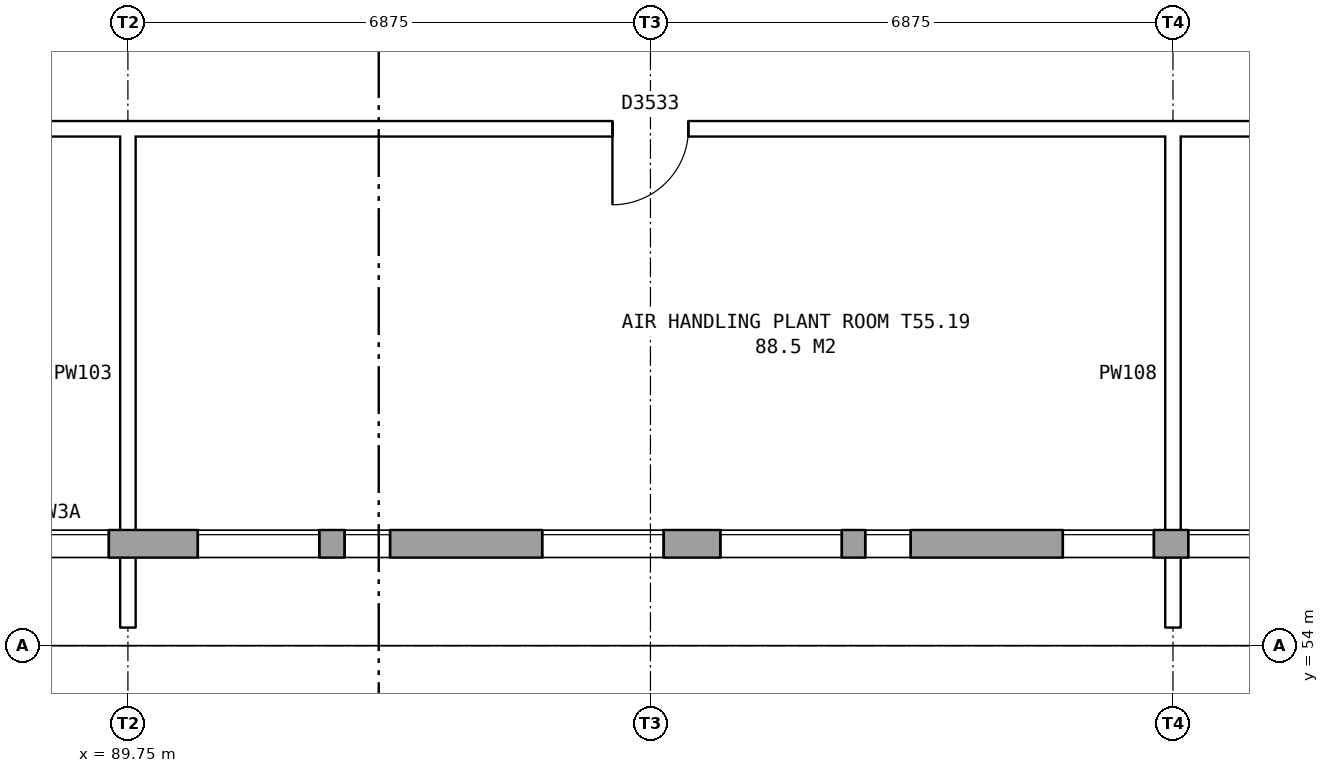
"""IFC4 building model, lengths in metres.
Left out: names, types, materials, properties, quantities, classifications, styles, units other than length and angle.
Written with IfcOpenShell. Run it as: python <this file> out.ifc"""

import sys

from ifc_helpers import new_model, si_unit, direction, frame, frame_2d, origin, place, context, subcontext, project, spatial, rectangle, extrude, element, fill, save


model = new_model("IFC4")
c1 = context("Model", 3, precision=1e-05, world=origin(), true_north=direction((0.0, 1.0)))
c2 = subcontext(c1, "Body", "Model", "MODEL_VIEW")
j1 = project(units=[si_unit("LENGTHUNIT", "METRE"), si_unit("PLANEANGLEUNIT", "RADIAN")], contexts=[c1])
p1 = place(None, origin())
s1 = spatial("IfcSite", under=j1, at=p1, CompositionType="ELEMENT")
p2 = place(p1, origin())
s2 = spatial("IfcBuilding", under=s1, at=p2, CompositionType="ELEMENT")
p3 = place(p2, frame((0.0, 0.0, 194.4)))
s3 = spatial("IfcBuildingStorey", under=s2, at=p3, CompositionType="ELEMENT", Elevation=194.4)
p4 = place(p3, frame((76.15, 55.34, 0.0), z_axis=(0.0, 0.0, 1.0), x_axis=(1.0, 0.0, 0.0)))
e1 = element("IfcWall", 1, at=p4, inside=s3, PredefinedType="STANDARD", context=c2, shape_type="SweptSolid", body=[
    extrude(rectangle(XDim=54.7, YDim=0.36, at=frame_2d((27.35, 0.0))), origin(), (0.0, 0.0, 1.0), 3.95),
])
p5 = place(p4, frame((0.769, 0.0, 1.5)))
e2 = element("IfcOpeningElement", 2, at=p5, cuts=e1, PredefinedType="OPENING", context=c2, shape_type="SweptSolid", body=[
    extrude(rectangle(XDim=1.6, YDim=1.2, at=frame_2d((0.8, 0.6))), frame((0.0, 0.19, 0.0), z_axis=(0.0, -1.0, 0.0), x_axis=(1.0, 0.0, 0.0)), (0.0, 0.0, 1.0), 0.38),
])
p6 = place(p4, frame((2.7, 0.0, 1.5)))
e3 = element("IfcOpeningElement", 3, at=p6, cuts=e1, PredefinedType="OPENING", context=c2, shape_type="SweptSolid", body=[
    extrude(rectangle(XDim=0.6, YDim=1.2, at=frame_2d((0.3, 0.6))), frame((0.0, 0.19, 0.0), z_axis=(0.0, -1.0, 0.0), x_axis=(1.0, 0.0, 0.0)), (0.0, 0.0, 1.0), 0.38),
])
p7 = place(p4, frame((7.644, 0.0, 1.5)))
e4 = element("IfcOpeningElement", 4, at=p7, cuts=e1, PredefinedType="OPENING", context=c2, shape_type="SweptSolid", body=[
    extrude(rectangle(XDim=1.6, YDim=1.2, at=frame_2d((0.8, 0.6))), frame((0.0, 0.19, 0.0), z_axis=(0.0, -1.0, 0.0), x_axis=(1.0, 0.0, 0.0)), (0.0, 0.0, 1.0), 0.38),
])
p8 = place(p4, frame((5.3, 0.0, 1.5)))
e5 = element("IfcOpeningElement", 5, at=p8, cuts=e1, PredefinedType="OPENING", context=c2, shape_type="SweptSolid", body=[
    extrude(rectangle(XDim=1.6, YDim=1.2, at=frame_2d((0.8, 0.6))), frame((0.0, 0.19, 0.0), z_axis=(0.0, -1.0, 0.0), x_axis=(1.0, 0.0, 0.0)), (0.0, 0.0, 1.0), 0.38),
])
p9 = place(p4, frame((14.519, 0.0, 1.5)))
e6 = element("IfcOpeningElement", 6, at=p9, cuts=e1, PredefinedType="OPENING", context=c2, shape_type="SweptSolid", body=[
    extrude(rectangle(XDim=1.6, YDim=1.2, at=frame_2d((0.8, 0.6))), frame((0.0, 0.19, 0.0), z_axis=(0.0, -1.0, 0.0), x_axis=(1.0, 0.0, 0.0)), (0.0, 0.0, 1.0), 0.38),
])
p10 = place(p4, frame((16.45, 0.0, 1.5)))
e7 = element("IfcOpeningElement", 7, at=p10, cuts=e1, PredefinedType="OPENING", context=c2, shape_type="SweptSolid", body=[
    extrude(rectangle(XDim=0.6, YDim=1.2, at=frame_2d((0.3, 0.6))), frame((0.0, 0.19, 0.0), z_axis=(0.0, -1.0, 0.0), x_axis=(1.0, 0.0, 0.0)), (0.0, 0.0, 1.0), 0.38),
])
p11 = place(p4, frame((21.394, 0.0, 1.5)))
e8 = element("IfcOpeningElement", 8, at=p11, cuts=e1, PredefinedType="OPENING", context=c2, shape_type="SweptSolid", body=[
    extrude(rectangle(XDim=1.6, YDim=1.2, at=frame_2d((0.8, 0.6))), frame((0.0, 0.19, 0.0), z_axis=(0.0, -1.0, 0.0), x_axis=(1.0, 0.0, 0.0)), (0.0, 0.0, 1.0), 0.38),
])
p12 = place(p4, frame((19.05, 0.0, 1.5)))
e9 = element("IfcOpeningElement", 9, at=p12, cuts=e1, PredefinedType="OPENING", context=c2, shape_type="SweptSolid", body=[
    extrude(rectangle(XDim=1.6, YDim=1.2, at=frame_2d((0.8, 0.6))), frame((0.0, 0.19, 0.0), z_axis=(0.0, -1.0, 0.0), x_axis=(1.0, 0.0, 0.0)), (0.0, 0.0, 1.0), 0.38),
])
p13 = place(p4, frame((27.55, 0.0, 1.5)))
e10 = element("IfcOpeningElement", 10, at=p13, cuts=e1, PredefinedType="OPENING", context=c2, shape_type="SweptSolid", body=[
    extrude(rectangle(XDim=1.2, YDim=1.2, at=frame_2d((0.6, 0.6))), frame((0.0, 0.19, 0.0), z_axis=(0.0, -1.0, 0.0), x_axis=(1.0, 0.0, 0.0)), (0.0, 0.0, 1.0), 0.38),
])
p14 = place(p4, frame((31.706, 0.0, 1.5)))
e11 = element("IfcOpeningElement", 11, at=p14, cuts=e1, PredefinedType="OPENING", context=c2, shape_type="SweptSolid", body=[
    extrude(rectangle(XDim=1.6, YDim=1.2, at=frame_2d((0.8, 0.6))), frame((0.0, 0.19, 0.0), z_axis=(0.0, -1.0, 0.0), x_axis=(1.0, 0.0, 0.0)), (0.0, 0.0, 1.0), 0.38),
])
p15 = place(p4, frame((30.65, 0.0, 1.5)))
e12 = element("IfcOpeningElement", 12, at=p15, cuts=e1, PredefinedType="OPENING", context=c2, shape_type="SweptSolid", body=[
    extrude(rectangle(XDim=0.6, YDim=1.2, at=frame_2d((0.3, 0.6))), frame((0.0, 0.19, 0.0), z_axis=(0.0, -1.0, 0.0), x_axis=(1.0, 0.0, 0.0)), (0.0, 0.0, 1.0), 0.38),
])
p16 = place(p4, frame((38.581, 0.0, 1.5)))
e13 = element("IfcOpeningElement", 13, at=p16, cuts=e1, PredefinedType="OPENING", context=c2, shape_type="SweptSolid", body=[
    extrude(rectangle(XDim=1.6, YDim=1.2, at=frame_2d((0.8, 0.6))), frame((0.0, 0.19, 0.0), z_axis=(0.0, -1.0, 0.0), x_axis=(1.0, 0.0, 0.0)), (0.0, 0.0, 1.0), 0.38),
])
p17 = place(p4, frame((41.3, 0.0, 1.5)))
e14 = element("IfcOpeningElement", 14, at=p17, cuts=e1, PredefinedType="OPENING", context=c2, shape_type="SweptSolid", body=[
    extrude(rectangle(XDim=1.2, YDim=1.2, at=frame_2d((0.6, 0.6))), frame((0.0, 0.19, 0.0), z_axis=(0.0, -1.0, 0.0), x_axis=(1.0, 0.0, 0.0)), (0.0, 0.0, 1.0), 0.38),
])
p18 = place(p4, frame((45.456, 0.0, 1.5)))
e15 = element("IfcOpeningElement", 15, at=p18, cuts=e1, PredefinedType="OPENING", context=c2, shape_type="SweptSolid", body=[
    extrude(rectangle(XDim=1.6, YDim=1.2, at=frame_2d((0.8, 0.6))), frame((0.0, 0.19, 0.0), z_axis=(0.0, -1.0, 0.0), x_axis=(1.0, 0.0, 0.0)), (0.0, 0.0, 1.0), 0.38),
])
p19 = place(p4, frame((44.4, 0.0, 1.5)))
e16 = element("IfcOpeningElement", 16, at=p19, cuts=e1, PredefinedType="OPENING", context=c2, shape_type="SweptSolid", body=[
    extrude(rectangle(XDim=0.6, YDim=1.2, at=frame_2d((0.3, 0.6))), frame((0.0, 0.19, 0.0), z_axis=(0.0, -1.0, 0.0), x_axis=(1.0, 0.0, 0.0)), (0.0, 0.0, 1.0), 0.38),
])
p20 = place(p4, frame((52.331, 0.0, 1.5)))
e17 = element("IfcOpeningElement", 17, at=p20, cuts=e1, PredefinedType="OPENING", context=c2, shape_type="SweptSolid", body=[
    extrude(rectangle(XDim=1.6, YDim=1.2, at=frame_2d((0.8, 0.6))), frame((0.0, 0.19, 0.0), z_axis=(0.0, -1.0, 0.0), x_axis=(1.0, 0.0, 0.0)), (0.0, 0.0, 1.0), 0.38),
])
p21 = place(p4, frame((9.55, 0.0, 1.5)))
e18 = element("IfcOpeningElement", 18, at=p21, cuts=e1, PredefinedType="OPENING", context=c2, shape_type="SweptSolid", body=[
    extrude(rectangle(XDim=0.6, YDim=1.2, at=frame_2d((0.3, 0.6))), frame((0.0, 0.19, 0.0), z_axis=(0.0, -1.0, 0.0), x_axis=(1.0, 0.0, 0.0)), (0.0, 0.0, 1.0), 0.38),
])
p22 = place(p4, frame((12.15, 0.0, 1.5)))
e19 = element("IfcOpeningElement", 19, at=p22, cuts=e1, PredefinedType="OPENING", context=c2, shape_type="SweptSolid", body=[
    extrude(rectangle(XDim=1.2, YDim=1.2, at=frame_2d((0.6, 0.6))), frame((0.0, 0.19, 0.0), z_axis=(0.0, -1.0, 0.0), x_axis=(1.0, 0.0, 0.0)), (0.0, 0.0, 1.0), 0.38),
])
p23 = place(p4, frame((23.3, 0.0, 1.5)))
e20 = element("IfcOpeningElement", 20, at=p23, cuts=e1, PredefinedType="OPENING", context=c2, shape_type="SweptSolid", body=[
    extrude(rectangle(XDim=0.6, YDim=1.2, at=frame_2d((0.3, 0.6))), frame((0.0, 0.19, 0.0), z_axis=(0.0, -1.0, 0.0), x_axis=(1.0, 0.0, 0.0)), (0.0, 0.0, 1.0), 0.38),
])
p24 = place(p4, frame((25.9, 0.0, 1.5)))
e21 = element("IfcOpeningElement", 21, at=p24, cuts=e1, PredefinedType="OPENING", context=c2, shape_type="SweptSolid", body=[
    extrude(rectangle(XDim=1.2, YDim=1.2, at=frame_2d((0.6, 0.6))), frame((0.0, 0.19, 0.0), z_axis=(0.0, -1.0, 0.0), x_axis=(1.0, 0.0, 0.0)), (0.0, 0.0, 1.0), 0.38),
])
p25 = place(p4, frame((33.65, 0.0, 1.5)))
e22 = element("IfcOpeningElement", 22, at=p25, cuts=e1, PredefinedType="OPENING", context=c2, shape_type="SweptSolid", body=[
    extrude(rectangle(XDim=1.6, YDim=1.2, at=frame_2d((0.8, 0.6))), frame((0.0, 0.19, 0.0), z_axis=(0.0, -1.0, 0.0), x_axis=(1.0, 0.0, 0.0)), (0.0, 0.0, 1.0), 0.38),
])
p26 = place(p4, frame((37.5, 0.0, 1.5)))
e23 = element("IfcOpeningElement", 23, at=p26, cuts=e1, PredefinedType="OPENING", context=c2, shape_type="SweptSolid", body=[
    extrude(rectangle(XDim=0.6, YDim=1.2, at=frame_2d((0.3, 0.6))), frame((0.0, 0.19, 0.0), z_axis=(0.0, -1.0, 0.0), x_axis=(1.0, 0.0, 0.0)), (0.0, 0.0, 1.0), 0.38),
])
p27 = place(p4, frame((47.4, 0.0, 1.5)))
e24 = element("IfcOpeningElement", 24, at=p27, cuts=e1, PredefinedType="OPENING", context=c2, shape_type="SweptSolid", body=[
    extrude(rectangle(XDim=1.6, YDim=1.2, at=frame_2d((0.8, 0.6))), frame((0.0, 0.19, 0.0), z_axis=(0.0, -1.0, 0.0), x_axis=(1.0, 0.0, 0.0)), (0.0, 0.0, 1.0), 0.38),
])
p28 = place(p4, frame((51.25, 0.0, 1.5)))
e25 = element("IfcOpeningElement", 25, at=p28, cuts=e1, PredefinedType="OPENING", context=c2, shape_type="SweptSolid", body=[
    extrude(rectangle(XDim=0.6, YDim=1.2, at=frame_2d((0.3, 0.6))), frame((0.0, 0.19, 0.0), z_axis=(0.0, -1.0, 0.0), x_axis=(1.0, 0.0, 0.0)), (0.0, 0.0, 1.0), 0.38),
])
p29 = place(p3, frame((32.24, 60.8, 0.0), z_axis=(0.0, 0.0, 1.0), x_axis=(1.0, 0.0, 0.0)))
e26 = element("IfcWall", 26, at=p29, inside=s3, PredefinedType="PARTITIONING", context=c2, shape_type="SweptSolid", body=[
    extrude(rectangle(XDim=136.52, YDim=0.2, at=frame_2d((68.26, 0.0))), origin(), (0.0, 0.0, 1.0), 3.95),
])
p30 = place(p29, frame((3.44, 0.0, 0.0)))
e27 = element("IfcOpeningElement", 27, at=p30, cuts=e26, PredefinedType="OPENING", context=c2, shape_type="SweptSolid", body=[
    extrude(rectangle(XDim=1.0, YDim=2.1, at=frame_2d((0.5, 1.05))), frame((0.0, 0.11, 0.0), z_axis=(0.0, -1.0, 0.0), x_axis=(1.0, 0.0, 0.0)), (0.0, 0.0, 1.0), 0.22),
])
p31 = place(p29, frame((13.26, 0.0, 0.0)))
e28 = element("IfcOpeningElement", 28, at=p31, cuts=e26, PredefinedType="OPENING", context=c2, shape_type="SweptSolid", body=[
    extrude(rectangle(XDim=1.0, YDim=2.1, at=frame_2d((0.5, 1.05))), frame((0.0, 0.11, 0.0), z_axis=(0.0, -1.0, 0.0), x_axis=(1.0, 0.0, 0.0)), (0.0, 0.0, 1.0), 0.22),
])
p32 = place(p29, frame((25.26, 0.0, 0.0)))
e29 = element("IfcOpeningElement", 29, at=p32, cuts=e26, PredefinedType="OPENING", context=c2, shape_type="SweptSolid", body=[
    extrude(rectangle(XDim=1.0, YDim=2.1, at=frame_2d((0.5, 1.05))), frame((0.0, 0.11, 0.0), z_axis=(0.0, -1.0, 0.0), x_axis=(1.0, 0.0, 0.0)), (0.0, 0.0, 1.0), 0.22),
])
p33 = place(p29, frame((37.08, 0.0, 0.0)))
e30 = element("IfcOpeningElement", 30, at=p33, cuts=e26, PredefinedType="OPENING", context=c2, shape_type="SweptSolid", body=[
    extrude(rectangle(XDim=1.0, YDim=2.1, at=frame_2d((0.5, 1.05))), frame((0.0, 0.11, 0.0), z_axis=(0.0, -1.0, 0.0), x_axis=(1.0, 0.0, 0.0)), (0.0, 0.0, 1.0), 0.22),
])
p34 = place(p29, frame((49.955, 0.0, 0.0)))
e31 = element("IfcOpeningElement", 31, at=p34, cuts=e26, PredefinedType="OPENING", context=c2, shape_type="SweptSolid", body=[
    extrude(rectangle(XDim=1.0, YDim=2.1, at=frame_2d((0.5, 1.05))), frame((0.0, 0.11, 0.0), z_axis=(0.0, -1.0, 0.0), x_axis=(1.0, 0.0, 0.0)), (0.0, 0.0, 1.0), 0.22),
])
p35 = place(p29, frame((63.885, 0.0, 0.0)))
e32 = element("IfcOpeningElement", 32, at=p35, cuts=e26, PredefinedType="OPENING", context=c2, shape_type="SweptSolid", body=[
    extrude(rectangle(XDim=1.0, YDim=2.1, at=frame_2d((0.5, 1.05))), frame((0.0, 0.11, 0.0), z_axis=(0.0, -1.0, 0.0), x_axis=(1.0, 0.0, 0.0)), (0.0, 0.0, 1.0), 0.22),
])
p36 = place(p29, frame((77.635, 0.0, 0.0)))
e33 = element("IfcOpeningElement", 33, at=p36, cuts=e26, PredefinedType="OPENING", context=c2, shape_type="SweptSolid", body=[
    extrude(rectangle(XDim=1.0, YDim=2.1, at=frame_2d((0.5, 1.05))), frame((0.0, 0.11, 0.0), z_axis=(0.0, -1.0, 0.0), x_axis=(1.0, 0.0, 0.0)), (0.0, 0.0, 1.0), 0.22),
])
p37 = place(p29, frame((91.565, 0.0, 0.0)))
e34 = element("IfcOpeningElement", 34, at=p37, cuts=e26, PredefinedType="OPENING", context=c2, shape_type="SweptSolid", body=[
    extrude(rectangle(XDim=1.0, YDim=2.1, at=frame_2d((0.5, 1.05))), frame((0.0, 0.11, 0.0), z_axis=(0.0, -1.0, 0.0), x_axis=(1.0, 0.0, 0.0)), (0.0, 0.0, 1.0), 0.22),
])
p38 = place(p29, frame((104.44, 0.0, 0.0)))
e35 = element("IfcOpeningElement", 35, at=p38, cuts=e26, PredefinedType="OPENING", context=c2, shape_type="SweptSolid", body=[
    extrude(rectangle(XDim=1.0, YDim=2.1, at=frame_2d((0.5, 1.05))), frame((0.0, 0.11, 0.0), z_axis=(0.0, -1.0, 0.0), x_axis=(1.0, 0.0, 0.0)), (0.0, 0.0, 1.0), 0.22),
])
p39 = place(p29, frame((116.26, 0.0, 0.0)))
e36 = element("IfcOpeningElement", 36, at=p39, cuts=e26, PredefinedType="OPENING", context=c2, shape_type="SweptSolid", body=[
    extrude(rectangle(XDim=1.0, YDim=2.1, at=frame_2d((0.5, 1.05))), frame((0.0, 0.11, 0.0), z_axis=(0.0, -1.0, 0.0), x_axis=(1.0, 0.0, 0.0)), (0.0, 0.0, 1.0), 0.22),
])
p40 = place(p29, frame((129.08, 0.0, 0.0)))
e37 = element("IfcOpeningElement", 37, at=p40, cuts=e26, PredefinedType="OPENING", context=c2, shape_type="SweptSolid", body=[
    extrude(rectangle(XDim=1.0, YDim=2.1, at=frame_2d((0.5, 1.05))), frame((0.0, 0.11, 0.0), z_axis=(0.0, -1.0, 0.0), x_axis=(1.0, 0.0, 0.0)), (0.0, 0.0, 1.0), 0.22),
])
for number, where, z_axis, x_axis in (
    (38, (89.75, 54.24, 0.0), (0.0, 0.0, 1.0), (0.0, 1.0, 0.0)),
    (39, (103.5, 54.24, 0.0), (0.0, 0.0, 1.0), (0.0, 1.0, 0.0)),
):
    element("IfcWall", number, at=place(p3, frame(where, z_axis=z_axis, x_axis=x_axis)), inside=s3, PredefinedType="PARTITIONING", context=c2, shape_type="SweptSolid", body=[
        extrude(rectangle(XDim=6.66, YDim=0.2, at=frame_2d((3.33, 0.0))), origin(), (0.0, 0.0, 1.0), 3.417),
    ])
p41 = place(p9, origin())
e40 = element("IfcWindow", 40, at=p41, inside=s3, PartitioningType="DOUBLE_PANEL_HORIZONTAL", PredefinedType="WINDOW", context=c2, shape_type="SweptSolid", body=[
    extrude(rectangle(XDim=1.6, YDim=1.2, at=frame_2d((0.8, 0.6))), frame((0.0, 0.15, 0.0), z_axis=(0.0, -1.0, 0.0), x_axis=(1.0, 0.0, 0.0)), (0.0, 0.0, 1.0), 0.06),
])
fill(e6, e40)
p42 = place(p10, origin())
e41 = element("IfcWindow", 41, at=p42, inside=s3, PartitioningType="DOUBLE_PANEL_HORIZONTAL", PredefinedType="WINDOW", context=c2, shape_type="SweptSolid", body=[
    extrude(rectangle(XDim=0.6, YDim=1.2, at=frame_2d((0.3, 0.6))), frame((0.0, 0.15, 0.0), z_axis=(0.0, -1.0, 0.0), x_axis=(1.0, 0.0, 0.0)), (0.0, 0.0, 1.0), 0.06),
])
fill(e7, e41)
p43 = place(p11, origin())
e42 = element("IfcWindow", 42, at=p43, inside=s3, PartitioningType="DOUBLE_PANEL_HORIZONTAL", PredefinedType="WINDOW", context=c2, shape_type="SweptSolid", body=[
    extrude(rectangle(XDim=1.6, YDim=1.2, at=frame_2d((0.8, 0.6))), frame((0.0, 0.15, 0.0), z_axis=(0.0, -1.0, 0.0), x_axis=(1.0, 0.0, 0.0)), (0.0, 0.0, 1.0), 0.06),
])
fill(e8, e42)
p44 = place(p12, origin())
e43 = element("IfcWindow", 43, at=p44, inside=s3, PartitioningType="DOUBLE_PANEL_HORIZONTAL", PredefinedType="WINDOW", context=c2, shape_type="SweptSolid", body=[
    extrude(rectangle(XDim=1.6, YDim=1.2, at=frame_2d((0.8, 0.6))), frame((0.0, 0.15, 0.0), z_axis=(0.0, -1.0, 0.0), x_axis=(1.0, 0.0, 0.0)), (0.0, 0.0, 1.0), 0.06),
])
fill(e9, e43)
p45 = place(p13, origin())
e44 = element("IfcWindow", 44, at=p45, inside=s3, PartitioningType="DOUBLE_PANEL_HORIZONTAL", PredefinedType="WINDOW", context=c2, shape_type="SweptSolid", body=[
    extrude(rectangle(XDim=1.2, YDim=1.2, at=frame_2d((0.6, 0.6))), frame((0.0, 0.15, 0.0), z_axis=(0.0, -1.0, 0.0), x_axis=(1.0, 0.0, 0.0)), (0.0, 0.0, 1.0), 0.06),
])
fill(e10, e44)
p46 = place(p35, frame((1.0, 0.0, 0.0), z_axis=(0.0, 0.0, 1.0), x_axis=(-1.0, 0.0, 0.0)))
e45 = element("IfcDoor", 45, at=p46, inside=s3, OperationType="SINGLE_SWING_RIGHT", PredefinedType="DOOR", context=c2, shape_type="SweptSolid", body=[
    extrude(rectangle(XDim=1.0, YDim=2.1, at=frame_2d((0.5, 1.05))), frame((0.0, 0.025, 0.0), z_axis=(0.0, -1.0, 0.0), x_axis=(1.0, 0.0, 0.0)), (0.0, 0.0, 1.0), 0.05),
])
fill(e32, e45)
p47 = place(p22, origin())
e46 = element("IfcWindow", 46, at=p47, inside=s3, PartitioningType="DOUBLE_PANEL_HORIZONTAL", PredefinedType="WINDOW", context=c2, shape_type="SweptSolid", body=[
    extrude(rectangle(XDim=1.2, YDim=1.2, at=frame_2d((0.6, 0.6))), frame((0.0, 0.15, 0.0), z_axis=(0.0, -1.0, 0.0), x_axis=(1.0, 0.0, 0.0)), (0.0, 0.0, 1.0), 0.06),
])
fill(e19, e46)
p48 = place(p23, origin())
e47 = element("IfcWindow", 47, at=p48, inside=s3, PartitioningType="DOUBLE_PANEL_HORIZONTAL", PredefinedType="WINDOW", context=c2, shape_type="SweptSolid", body=[
    extrude(rectangle(XDim=0.6, YDim=1.2, at=frame_2d((0.3, 0.6))), frame((0.0, 0.15, 0.0), z_axis=(0.0, -1.0, 0.0), x_axis=(1.0, 0.0, 0.0)), (0.0, 0.0, 1.0), 0.06),
])
fill(e20, e47)
p49 = place(p24, origin())
e48 = element("IfcWindow", 48, at=p49, inside=s3, PartitioningType="DOUBLE_PANEL_HORIZONTAL", PredefinedType="WINDOW", context=c2, shape_type="SweptSolid", body=[
    extrude(rectangle(XDim=1.2, YDim=1.2, at=frame_2d((0.6, 0.6))), frame((0.0, 0.15, 0.0), z_axis=(0.0, -1.0, 0.0), x_axis=(1.0, 0.0, 0.0)), (0.0, 0.0, 1.0), 0.06),
])
fill(e21, e48)
save(model, sys.argv[1])
